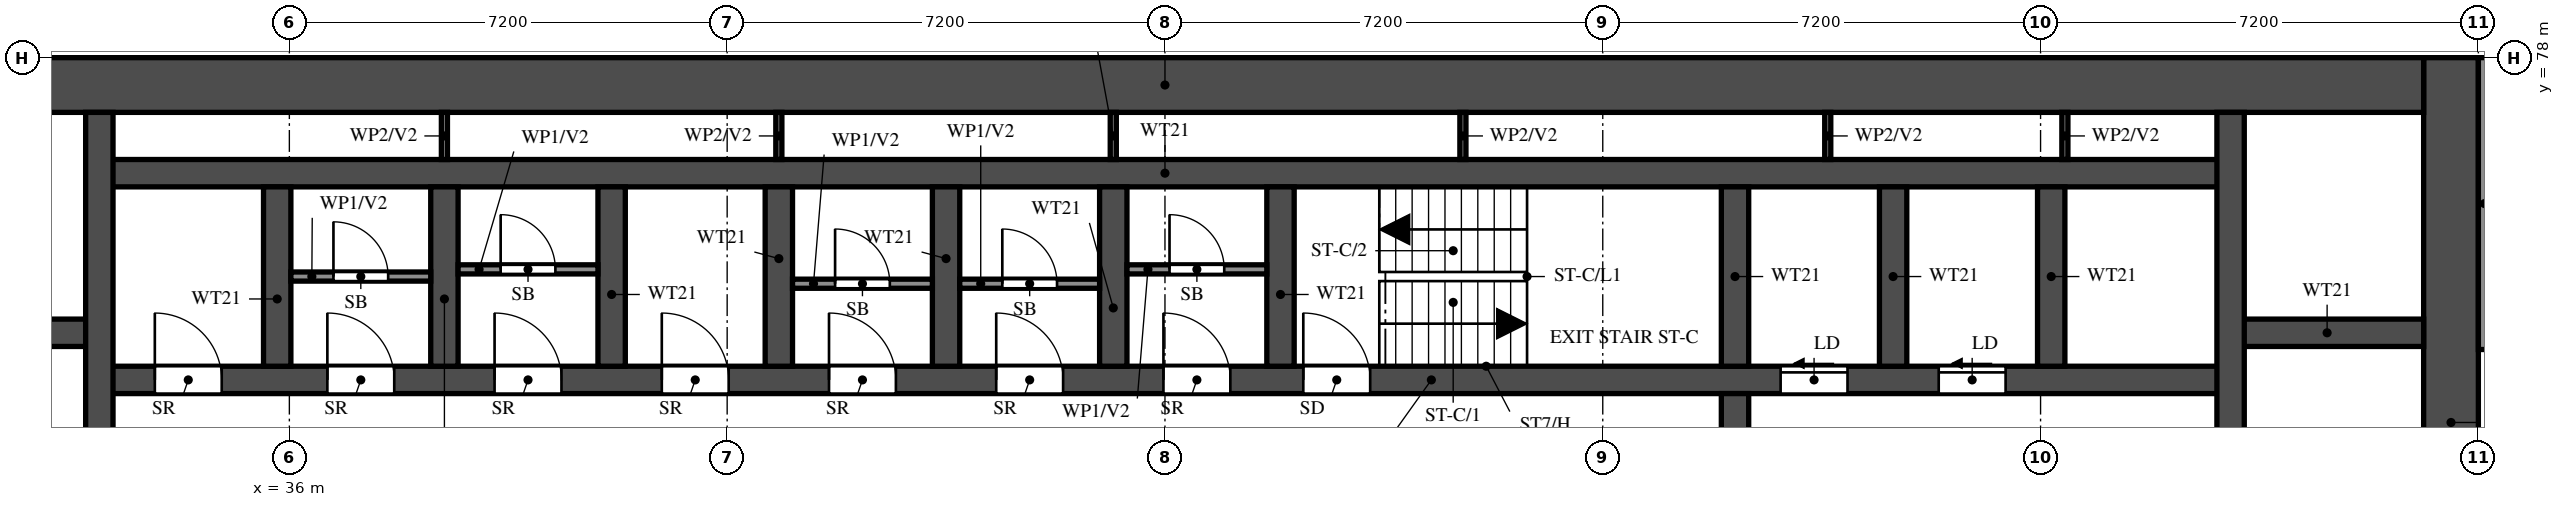
"""IFC4 building model, lengths in metres.
Left out: names, types, materials, properties, quantities, classifications, styles, units other than length and angle.
Written with IfcOpenShell. Run it as: python <this file> out.ifc"""

import sys

from ifc_helpers import new_model, si_unit, direction, frame, frame_2d, origin, place, context, subcontext, project, spatial, rectangle, extrude, element, fill, save


model = new_model("IFC4")
c1 = context("Model", 3, precision=1e-05, world=origin(), true_north=direction((0.0, 1.0)))
c2 = subcontext(c1, "Body", "Model", "MODEL_VIEW")
j1 = project(units=[si_unit("LENGTHUNIT", "METRE"), si_unit("PLANEANGLEUNIT", "RADIAN")], contexts=[c1])
p1 = place(None, origin())
s1 = spatial("IfcSite", under=j1, at=p1, CompositionType="ELEMENT")
p2 = place(p1, origin())
s2 = spatial("IfcBuilding", under=s1, at=p2, CompositionType="ELEMENT")
p3 = place(p2, frame((0.0, 0.0, 86.5)))
s3 = spatial("IfcBuildingStorey", under=s2, at=p3, CompositionType="ELEMENT", Elevation=86.5)
p4 = place(p3, frame((71.55, 66.0, 0.0), z_axis=(0.0, 0.0, 1.0), x_axis=(0.0, 1.0, 0.0)))
e1 = element("IfcWall", 1, at=p4, inside=s3, PredefinedType="SHEAR", context=c2, shape_type="SweptSolid", body=[
    extrude(rectangle(XDim=12.0, YDim=0.9, at=frame_2d((6.0, 0.0))), origin(), (0.0, 0.0, 1.0), 3.18),
])
p5 = place(p3, frame((29.7, 77.55, 0.0), z_axis=(0.0, 0.0, 1.0), x_axis=(1.0, 0.0, 0.0)))
e2 = element("IfcWall", 2, at=p5, inside=s3, PredefinedType="SHEAR", context=c2, shape_type="SweptSolid", body=[
    extrude(rectangle(XDim=41.4, YDim=0.9, at=frame_2d((20.7, 0.0))), origin(), (0.0, 0.0, 1.0), 3.18),
])
p6 = place(p3, frame((32.875, 72.7, 0.0), z_axis=(0.0, 0.0, 1.0), x_axis=(1.0, 0.0, 0.0)))
e3 = element("IfcWall", 3, at=p6, inside=s3, PredefinedType="SHEAR", context=c2, shape_type="SweptSolid", body=[
    extrude(rectangle(XDim=35.05, YDim=0.45, at=frame_2d((17.525, 0.0))), origin(), (0.0, 0.0, 1.0), 3.18),
])
p7 = place(p6, frame((19.8, 0.0, 0.0)))
e4 = element("IfcOpeningElement", 4, at=p7, cuts=e3, PredefinedType="OPENING", context=c2, shape_type="SweptSolid", body=[
    extrude(rectangle(XDim=1.1, YDim=2.1, at=frame_2d((0.55, 1.05))), frame((0.0, 0.235, 0.0), z_axis=(0.0, -1.0, 0.0), x_axis=(1.0, 0.0, 0.0)), (0.0, 0.0, 1.0), 0.47),
])
p8 = place(p6, frame((27.65, 0.0, 0.0)))
e5 = element("IfcOpeningElement", 5, at=p8, cuts=e3, PredefinedType="OPENING", context=c2, shape_type="SweptSolid", body=[
    extrude(rectangle(XDim=1.1, YDim=2.1, at=frame_2d((0.55, 1.05))), frame((0.0, 0.235, 0.0), z_axis=(0.0, -1.0, 0.0), x_axis=(1.0, 0.0, 0.0)), (0.0, 0.0, 1.0), 0.47),
])
p9 = place(p6, frame((30.25, 0.0, 0.0)))
e6 = element("IfcOpeningElement", 6, at=p9, cuts=e3, PredefinedType="OPENING", context=c2, shape_type="SweptSolid", body=[
    extrude(rectangle(XDim=1.1, YDim=2.1, at=frame_2d((0.55, 1.05))), frame((0.0, 0.235, 0.0), z_axis=(0.0, -1.0, 0.0), x_axis=(1.0, 0.0, 0.0)), (0.0, 0.0, 1.0), 0.47),
])
p10 = place(p6, frame((3.75, 0.0, 0.0)))
e7 = element("IfcOpeningElement", 7, at=p10, cuts=e3, PredefinedType="OPENING", context=c2, shape_type="SweptSolid", body=[
    extrude(rectangle(XDim=1.1, YDim=2.1, at=frame_2d((0.55, 1.05))), frame((0.0, 0.235, 0.0), z_axis=(0.0, -1.0, 0.0), x_axis=(1.0, 0.0, 0.0)), (0.0, 0.0, 1.0), 0.47),
])
p11 = place(p6, frame((6.5, 0.0, 0.0)))
e8 = element("IfcOpeningElement", 8, at=p11, cuts=e3, PredefinedType="OPENING", context=c2, shape_type="SweptSolid", body=[
    extrude(rectangle(XDim=1.1, YDim=2.1, at=frame_2d((0.55, 1.05))), frame((0.0, 0.235, 0.0), z_axis=(0.0, -1.0, 0.0), x_axis=(1.0, 0.0, 0.0)), (0.0, 0.0, 1.0), 0.47),
])
p12 = place(p6, frame((9.25, 0.0, 0.0)))
e9 = element("IfcOpeningElement", 9, at=p12, cuts=e3, PredefinedType="OPENING", context=c2, shape_type="SweptSolid", body=[
    extrude(rectangle(XDim=1.1, YDim=2.1, at=frame_2d((0.55, 1.05))), frame((0.0, 0.235, 0.0), z_axis=(0.0, -1.0, 0.0), x_axis=(1.0, 0.0, 0.0)), (0.0, 0.0, 1.0), 0.47),
])
p13 = place(p6, frame((12.0, 0.0, 0.0)))
e10 = element("IfcOpeningElement", 10, at=p13, cuts=e3, PredefinedType="OPENING", context=c2, shape_type="SweptSolid", body=[
    extrude(rectangle(XDim=1.1, YDim=2.1, at=frame_2d((0.55, 1.05))), frame((0.0, 0.235, 0.0), z_axis=(0.0, -1.0, 0.0), x_axis=(1.0, 0.0, 0.0)), (0.0, 0.0, 1.0), 0.47),
])
p14 = place(p6, frame((14.75, 0.0, 0.0)))
e11 = element("IfcOpeningElement", 11, at=p14, cuts=e3, PredefinedType="OPENING", context=c2, shape_type="SweptSolid", body=[
    extrude(rectangle(XDim=1.1, YDim=2.1, at=frame_2d((0.55, 1.05))), frame((0.0, 0.235, 0.0), z_axis=(0.0, -1.0, 0.0), x_axis=(1.0, 0.0, 0.0)), (0.0, 0.0, 1.0), 0.47),
])
p15 = place(p6, frame((17.5, 0.0, 0.0)))
e12 = element("IfcOpeningElement", 12, at=p15, cuts=e3, PredefinedType="OPENING", context=c2, shape_type="SweptSolid", body=[
    extrude(rectangle(XDim=1.1, YDim=2.1, at=frame_2d((0.55, 1.05))), frame((0.0, 0.235, 0.0), z_axis=(0.0, -1.0, 0.0), x_axis=(1.0, 0.0, 0.0)), (0.0, 0.0, 1.0), 0.47),
])
p16 = place(p6, frame((0.913, 0.0, 0.0)))
e13 = element("IfcOpeningElement", 13, at=p16, cuts=e3, PredefinedType="OPENING", context=c2, shape_type="SweptSolid", body=[
    extrude(rectangle(XDim=1.1, YDim=2.1, at=frame_2d((0.55, 1.05))), frame((0.0, 0.235, 0.0), z_axis=(0.0, -1.0, 0.0), x_axis=(1.0, 0.0, 0.0)), (0.0, 0.0, 1.0), 0.47),
])
p17 = place(p3, frame((32.875, 76.1, 0.0), z_axis=(0.0, 0.0, 1.0), x_axis=(1.0, 0.0, 0.0)))
e14 = element("IfcWall", 14, at=p17, inside=s3, PredefinedType="SHEAR", context=c2, shape_type="SweptSolid", body=[
    extrude(rectangle(XDim=35.05, YDim=0.45, at=frame_2d((17.525, 0.0))), origin(), (0.0, 0.0, 1.0), 3.18),
])
for number, where, z_axis, x_axis in (
    (15, (29.7, 73.475, 0.0), (0.0, 0.0, 1.0), (1.0, 0.0, 0.0)),
    (16, (67.925, 73.475, 0.0), (0.0, 0.0, 1.0), (1.0, 0.0, 0.0)),
):
    element("IfcWall", number, at=place(p3, frame(where, z_axis=z_axis, x_axis=x_axis)), inside=s3, PredefinedType="SHEAR", context=c2, shape_type="SweptSolid", body=[
        extrude(rectangle(XDim=3.175, YDim=0.45, at=frame_2d((1.587, 0.0))), origin(), (0.0, 0.0, 1.0), 3.18),
    ])
p18 = place(p3, frame((32.875, 66.45, 0.0), z_axis=(0.0, 0.0, 1.0), x_axis=(0.0, 1.0, 0.0)))
e17 = element("IfcWall", 17, at=p18, inside=s3, PredefinedType="SHEAR", context=c2, shape_type="SweptSolid", body=[
    extrude(rectangle(XDim=10.65, YDim=0.45, at=frame_2d((5.325, 0.0))), origin(), (0.0, 0.0, 1.0), 3.18),
])
p19 = place(p3, frame((67.925, 66.45, 0.0), z_axis=(0.0, 0.0, 1.0), x_axis=(0.0, 1.0, 0.0)))
e18 = element("IfcWall", 18, at=p19, inside=s3, PredefinedType="SHEAR", context=c2, shape_type="SweptSolid", body=[
    extrude(rectangle(XDim=10.65, YDim=0.45, at=frame_2d((5.325, 0.0))), origin(), (0.0, 0.0, 1.0), 3.18),
])
p20 = place(p19, frame((0.15, 0.0, 0.0)))
e19 = element("IfcOpeningElement", 19, at=p20, cuts=e18, PredefinedType="OPENING", context=c2, shape_type="SweptSolid", body=[
    extrude(rectangle(XDim=1.1, YDim=2.1, at=frame_2d((0.55, 1.05))), frame((0.0, 0.235, 0.0), z_axis=(0.0, -1.0, 0.0), x_axis=(1.0, 0.0, 0.0)), (0.0, 0.0, 1.0), 0.47),
])
p21 = place(p3, frame((59.775, 66.45, 0.0), z_axis=(0.0, 0.0, 1.0), x_axis=(0.0, 1.0, 0.0)))
e20 = element("IfcWall", 20, at=p21, inside=s3, PredefinedType="SHEAR", context=c2, shape_type="SweptSolid", body=[
    extrude(rectangle(XDim=6.025, YDim=0.45, at=frame_2d((3.013, 0.0))), origin(), (0.0, 0.0, 1.0), 3.18),
])
p22 = place(p21, frame((3.85, 0.0, 0.0)))
e21 = element("IfcOpeningElement", 21, at=p22, cuts=e20, PredefinedType="OPENING", context=c2, shape_type="SweptSolid", body=[
    extrude(rectangle(XDim=1.2, YDim=2.1, at=frame_2d((0.6, 1.05))), frame((0.0, 0.235, 0.0), z_axis=(0.0, -1.0, 0.0), x_axis=(1.0, 0.0, 0.0)), (0.0, 0.0, 1.0), 0.47),
])
for number, where, z_axis, x_axis in (
    (22, (59.775, 72.925, 0.0), (0.0, 0.0, 1.0), (0.0, 1.0, 0.0)),
    (23, (35.8, 72.925, 0.0), (0.0, 0.0, 1.0), (0.0, 1.0, 0.0)),
    (24, (38.55, 72.925, 0.0), (0.0, 0.0, 1.0), (0.0, 1.0, 0.0)),
    (25, (41.3, 72.925, 0.0), (0.0, 0.0, 1.0), (0.0, 1.0, 0.0)),
    (26, (44.05, 72.925, 0.0), (0.0, 0.0, 1.0), (0.0, 1.0, 0.0)),
    (27, (46.8, 72.925, 0.0), (0.0, 0.0, 1.0), (0.0, 1.0, 0.0)),
    (28, (49.55, 72.925, 0.0), (0.0, 0.0, 1.0), (0.0, 1.0, 0.0)),
    (29, (52.3, 72.925, 0.0), (0.0, 0.0, 1.0), (0.0, 1.0, 0.0)),
    (30, (62.375, 72.925, 0.0), (0.0, 0.0, 1.0), (0.0, 1.0, 0.0)),
    (31, (64.975, 72.925, 0.0), (0.0, 0.0, 1.0), (0.0, 1.0, 0.0)),
):
    element("IfcWall", number, at=place(p3, frame(where, z_axis=z_axis, x_axis=x_axis)), inside=s3, PredefinedType="SHEAR", context=c2, shape_type="SweptSolid", body=[
        extrude(rectangle(XDim=2.95, YDim=0.45, at=frame_2d((1.475, 0.0))), origin(), (0.0, 0.0, 1.0), 3.18),
    ])
p23 = place(p3, frame((36.025, 74.4, 0.0), z_axis=(0.0, 0.0, 1.0), x_axis=(1.0, 0.0, 0.0)))
e32 = element("IfcWall", 32, at=p23, inside=s3, PredefinedType="PARTITIONING", context=c2, shape_type="SweptSolid", body=[
    extrude(rectangle(XDim=2.3, YDim=0.15, at=frame_2d((1.15, 0.0))), origin(), (0.0, 0.0, 1.0), 3.18),
])
p24 = place(p23, frame((0.7, 0.0, 0.0)))
e33 = element("IfcOpeningElement", 33, at=p24, cuts=e32, PredefinedType="OPENING", context=c2, shape_type="SweptSolid", body=[
    extrude(rectangle(XDim=0.9, YDim=2.1, at=frame_2d((0.45, 1.05))), frame((0.0, 0.085, 0.0), z_axis=(0.0, -1.0, 0.0), x_axis=(1.0, 0.0, 0.0)), (0.0, 0.0, 1.0), 0.17),
])
p25 = place(p3, frame((38.775, 74.518, 0.0), z_axis=(0.0, 0.0, 1.0), x_axis=(1.0, 0.0, 0.0)))
e34 = element("IfcWall", 34, at=p25, inside=s3, PredefinedType="PARTITIONING", context=c2, shape_type="SweptSolid", body=[
    extrude(rectangle(XDim=2.3, YDim=0.15, at=frame_2d((1.15, 0.0))), origin(), (0.0, 0.0, 1.0), 3.18),
])
p26 = place(p25, frame((0.7, 0.0, 0.0)))
e35 = element("IfcOpeningElement", 35, at=p26, cuts=e34, PredefinedType="OPENING", context=c2, shape_type="SweptSolid", body=[
    extrude(rectangle(XDim=0.9, YDim=2.1, at=frame_2d((0.45, 1.05))), frame((0.0, 0.085, 0.0), z_axis=(0.0, -1.0, 0.0), x_axis=(1.0, 0.0, 0.0)), (0.0, 0.0, 1.0), 0.17),
])
p27 = place(p3, frame((44.275, 74.282, 0.0), z_axis=(0.0, 0.0, 1.0), x_axis=(1.0, 0.0, 0.0)))
e36 = element("IfcWall", 36, at=p27, inside=s3, PredefinedType="PARTITIONING", context=c2, shape_type="SweptSolid", body=[
    extrude(rectangle(XDim=2.3, YDim=0.15, at=frame_2d((1.15, 0.0))), origin(), (0.0, 0.0, 1.0), 3.18),
])
p28 = place(p27, frame((0.7, 0.0, 0.0)))
e37 = element("IfcOpeningElement", 37, at=p28, cuts=e36, PredefinedType="OPENING", context=c2, shape_type="SweptSolid", body=[
    extrude(rectangle(XDim=0.9, YDim=2.1, at=frame_2d((0.45, 1.05))), frame((0.0, 0.085, 0.0), z_axis=(0.0, -1.0, 0.0), x_axis=(1.0, 0.0, 0.0)), (0.0, 0.0, 1.0), 0.17),
])
p29 = place(p3, frame((47.025, 74.282, 0.0), z_axis=(0.0, 0.0, 1.0), x_axis=(1.0, 0.0, 0.0)))
e38 = element("IfcWall", 38, at=p29, inside=s3, PredefinedType="PARTITIONING", context=c2, shape_type="SweptSolid", body=[
    extrude(rectangle(XDim=2.3, YDim=0.15, at=frame_2d((1.15, 0.0))), origin(), (0.0, 0.0, 1.0), 3.18),
])
p30 = place(p29, frame((0.7, 0.0, 0.0)))
e39 = element("IfcOpeningElement", 39, at=p30, cuts=e38, PredefinedType="OPENING", context=c2, shape_type="SweptSolid", body=[
    extrude(rectangle(XDim=0.9, YDim=2.1, at=frame_2d((0.45, 1.05))), frame((0.0, 0.085, 0.0), z_axis=(0.0, -1.0, 0.0), x_axis=(1.0, 0.0, 0.0)), (0.0, 0.0, 1.0), 0.17),
])
p31 = place(p3, frame((49.775, 74.518, 0.0), z_axis=(0.0, 0.0, 1.0), x_axis=(1.0, 0.0, 0.0)))
e40 = element("IfcWall", 40, at=p31, inside=s3, PredefinedType="PARTITIONING", context=c2, shape_type="SweptSolid", body=[
    extrude(rectangle(XDim=2.3, YDim=0.15, at=frame_2d((1.15, 0.0))), origin(), (0.0, 0.0, 1.0), 3.18),
])
p32 = place(p31, frame((0.7, 0.0, 0.0)))
e41 = element("IfcOpeningElement", 41, at=p32, cuts=e40, PredefinedType="OPENING", context=c2, shape_type="SweptSolid", body=[
    extrude(rectangle(XDim=0.9, YDim=2.1, at=frame_2d((0.45, 1.05))), frame((0.0, 0.085, 0.0), z_axis=(0.0, -1.0, 0.0), x_axis=(1.0, 0.0, 0.0)), (0.0, 0.0, 1.0), 0.17),
])
for number, where, z_axis, x_axis in (
    (42, (38.55, 76.325, 0.0), (0.0, 0.0, 1.0), (0.0, 1.0, 0.0)),
    (43, (44.05, 76.325, 0.0), (0.0, 0.0, 1.0), (0.0, 1.0, 0.0)),
    (44, (49.55, 76.325, 0.0), (0.0, 0.0, 1.0), (0.0, 1.0, 0.0)),
    (45, (55.3, 76.325, 0.0), (0.0, 0.0, 1.0), (0.0, 1.0, 0.0)),
    (46, (61.3, 76.325, 0.0), (0.0, 0.0, 1.0), (0.0, 1.0, 0.0)),
    (47, (65.2, 76.325, 0.0), (0.0, 0.0, 1.0), (0.0, 1.0, 0.0)),
):
    element("IfcWall", number, at=place(p3, frame(where, z_axis=z_axis, x_axis=x_axis)), inside=s3, PredefinedType="PARTITIONING", context=c2, shape_type="SweptSolid", body=[
        extrude(rectangle(XDim=0.775, YDim=0.1, at=frame_2d((0.388, 0.0))), origin(), (0.0, 0.0, 1.0), 3.18),
    ])
p33 = place(p3, frame((72.1, 73.2, 0.0), z_axis=(0.0, 0.0, 1.0), x_axis=(0.0, 1.0, 0.0)))
e48 = element("IfcWall", 48, at=p33, inside=s3, PredefinedType="SOLIDWALL", context=c2, shape_type="SweptSolid", body=[
    extrude(rectangle(XDim=4.8, YDim=0.2, at=frame_2d((2.4, 0.0))), origin(), (0.0, 0.0, 1.0), 3.18),
])
p34 = place(p7, origin())
e49 = element("IfcDoor", 49, at=p34, inside=s3, OperationType="SINGLE_SWING_LEFT", PredefinedType="DOOR", context=c2, shape_type="SweptSolid", body=[
    extrude(rectangle(XDim=1.1, YDim=2.1, at=frame_2d((0.55, 1.05))), frame((0.0, 0.025, 0.0), z_axis=(0.0, -1.0, 0.0), x_axis=(1.0, 0.0, 0.0)), (0.0, 0.0, 1.0), 0.05),
])
fill(e4, e49)
p35 = place(p8, origin())
e50 = element("IfcDoor", 50, at=p35, inside=s3, OperationType="SLIDING_TO_LEFT", PredefinedType="DOOR", context=c2, shape_type="SweptSolid", body=[
    extrude(rectangle(XDim=1.1, YDim=2.1, at=frame_2d((0.55, 1.05))), frame((0.0, 0.025, 0.0), z_axis=(0.0, -1.0, 0.0), x_axis=(1.0, 0.0, 0.0)), (0.0, 0.0, 1.0), 0.05),
])
fill(e5, e50)
p36 = place(p9, origin())
e51 = element("IfcDoor", 51, at=p36, inside=s3, OperationType="SLIDING_TO_LEFT", PredefinedType="DOOR", context=c2, shape_type="SweptSolid", body=[
    extrude(rectangle(XDim=1.1, YDim=2.1, at=frame_2d((0.55, 1.05))), frame((0.0, 0.025, 0.0), z_axis=(0.0, -1.0, 0.0), x_axis=(1.0, 0.0, 0.0)), (0.0, 0.0, 1.0), 0.05),
])
fill(e6, e51)
p37 = place(p10, origin())
e52 = element("IfcDoor", 52, at=p37, inside=s3, OperationType="SINGLE_SWING_LEFT", PredefinedType="DOOR", context=c2, shape_type="SweptSolid", body=[
    extrude(rectangle(XDim=1.1, YDim=2.1, at=frame_2d((0.55, 1.05))), frame((0.0, 0.025, 0.0), z_axis=(0.0, -1.0, 0.0), x_axis=(1.0, 0.0, 0.0)), (0.0, 0.0, 1.0), 0.05),
])
fill(e7, e52)
p38 = place(p24, origin())
e53 = element("IfcDoor", 53, at=p38, inside=s3, OperationType="SINGLE_SWING_LEFT", PredefinedType="DOOR", context=c2, shape_type="SweptSolid", body=[
    extrude(rectangle(XDim=0.9, YDim=2.1, at=frame_2d((0.45, 1.05))), frame((0.0, 0.025, 0.0), z_axis=(0.0, -1.0, 0.0), x_axis=(1.0, 0.0, 0.0)), (0.0, 0.0, 1.0), 0.05),
])
fill(e33, e53)
p39 = place(p11, origin())
e54 = element("IfcDoor", 54, at=p39, inside=s3, OperationType="SINGLE_SWING_LEFT", PredefinedType="DOOR", context=c2, shape_type="SweptSolid", body=[
    extrude(rectangle(XDim=1.1, YDim=2.1, at=frame_2d((0.55, 1.05))), frame((0.0, 0.025, 0.0), z_axis=(0.0, -1.0, 0.0), x_axis=(1.0, 0.0, 0.0)), (0.0, 0.0, 1.0), 0.05),
])
fill(e8, e54)
p40 = place(p26, origin())
e55 = element("IfcDoor", 55, at=p40, inside=s3, OperationType="SINGLE_SWING_LEFT", PredefinedType="DOOR", context=c2, shape_type="SweptSolid", body=[
    extrude(rectangle(XDim=0.9, YDim=2.1, at=frame_2d((0.45, 1.05))), frame((0.0, 0.025, 0.0), z_axis=(0.0, -1.0, 0.0), x_axis=(1.0, 0.0, 0.0)), (0.0, 0.0, 1.0), 0.05),
])
fill(e35, e55)
p41 = place(p12, origin())
e56 = element("IfcDoor", 56, at=p41, inside=s3, OperationType="SINGLE_SWING_LEFT", PredefinedType="DOOR", context=c2, shape_type="SweptSolid", body=[
    extrude(rectangle(XDim=1.1, YDim=2.1, at=frame_2d((0.55, 1.05))), frame((0.0, 0.025, 0.0), z_axis=(0.0, -1.0, 0.0), x_axis=(1.0, 0.0, 0.0)), (0.0, 0.0, 1.0), 0.05),
])
fill(e9, e56)
p42 = place(p13, origin())
e57 = element("IfcDoor", 57, at=p42, inside=s3, OperationType="SINGLE_SWING_LEFT", PredefinedType="DOOR", context=c2, shape_type="SweptSolid", body=[
    extrude(rectangle(XDim=1.1, YDim=2.1, at=frame_2d((0.55, 1.05))), frame((0.0, 0.025, 0.0), z_axis=(0.0, -1.0, 0.0), x_axis=(1.0, 0.0, 0.0)), (0.0, 0.0, 1.0), 0.05),
])
fill(e10, e57)
p43 = place(p28, origin())
e58 = element("IfcDoor", 58, at=p43, inside=s3, OperationType="SINGLE_SWING_RIGHT", PredefinedType="DOOR", context=c2, shape_type="SweptSolid", body=[
    extrude(rectangle(XDim=0.9, YDim=2.1, at=frame_2d((0.45, 1.05))), frame((0.0, 0.025, 0.0), z_axis=(0.0, -1.0, 0.0), x_axis=(1.0, 0.0, 0.0)), (0.0, 0.0, 1.0), 0.05),
])
fill(e37, e58)
p44 = place(p14, origin())
e59 = element("IfcDoor", 59, at=p44, inside=s3, OperationType="SINGLE_SWING_LEFT", PredefinedType="DOOR", context=c2, shape_type="SweptSolid", body=[
    extrude(rectangle(XDim=1.1, YDim=2.1, at=frame_2d((0.55, 1.05))), frame((0.0, 0.025, 0.0), z_axis=(0.0, -1.0, 0.0), x_axis=(1.0, 0.0, 0.0)), (0.0, 0.0, 1.0), 0.05),
])
fill(e11, e59)
p45 = place(p30, origin())
e60 = element("IfcDoor", 60, at=p45, inside=s3, OperationType="SINGLE_SWING_LEFT", PredefinedType="DOOR", context=c2, shape_type="SweptSolid", body=[
    extrude(rectangle(XDim=0.9, YDim=2.1, at=frame_2d((0.45, 1.05))), frame((0.0, 0.025, 0.0), z_axis=(0.0, -1.0, 0.0), x_axis=(1.0, 0.0, 0.0)), (0.0, 0.0, 1.0), 0.05),
])
fill(e39, e60)
p46 = place(p15, origin())
e61 = element("IfcDoor", 61, at=p46, inside=s3, OperationType="SINGLE_SWING_LEFT", PredefinedType="DOOR", context=c2, shape_type="SweptSolid", body=[
    extrude(rectangle(XDim=1.1, YDim=2.1, at=frame_2d((0.55, 1.05))), frame((0.0, 0.025, 0.0), z_axis=(0.0, -1.0, 0.0), x_axis=(1.0, 0.0, 0.0)), (0.0, 0.0, 1.0), 0.05),
])
fill(e12, e61)
p47 = place(p32, origin())
e62 = element("IfcDoor", 62, at=p47, inside=s3, OperationType="SINGLE_SWING_LEFT", PredefinedType="DOOR", context=c2, shape_type="SweptSolid", body=[
    extrude(rectangle(XDim=0.9, YDim=2.1, at=frame_2d((0.45, 1.05))), frame((0.0, 0.025, 0.0), z_axis=(0.0, -1.0, 0.0), x_axis=(1.0, 0.0, 0.0)), (0.0, 0.0, 1.0), 0.05),
])
fill(e41, e62)
p48 = place(p16, origin())
e63 = element("IfcDoor", 63, at=p48, inside=s3, OperationType="SINGLE_SWING_LEFT", PredefinedType="DOOR", context=c2, shape_type="SweptSolid", body=[
    extrude(rectangle(XDim=1.1, YDim=2.1, at=frame_2d((0.55, 1.05))), frame((0.0, 0.025, 0.0), z_axis=(0.0, -1.0, 0.0), x_axis=(1.0, 0.0, 0.0)), (0.0, 0.0, 1.0), 0.05),
])
fill(e13, e63)
save(model, sys.argv[1])
